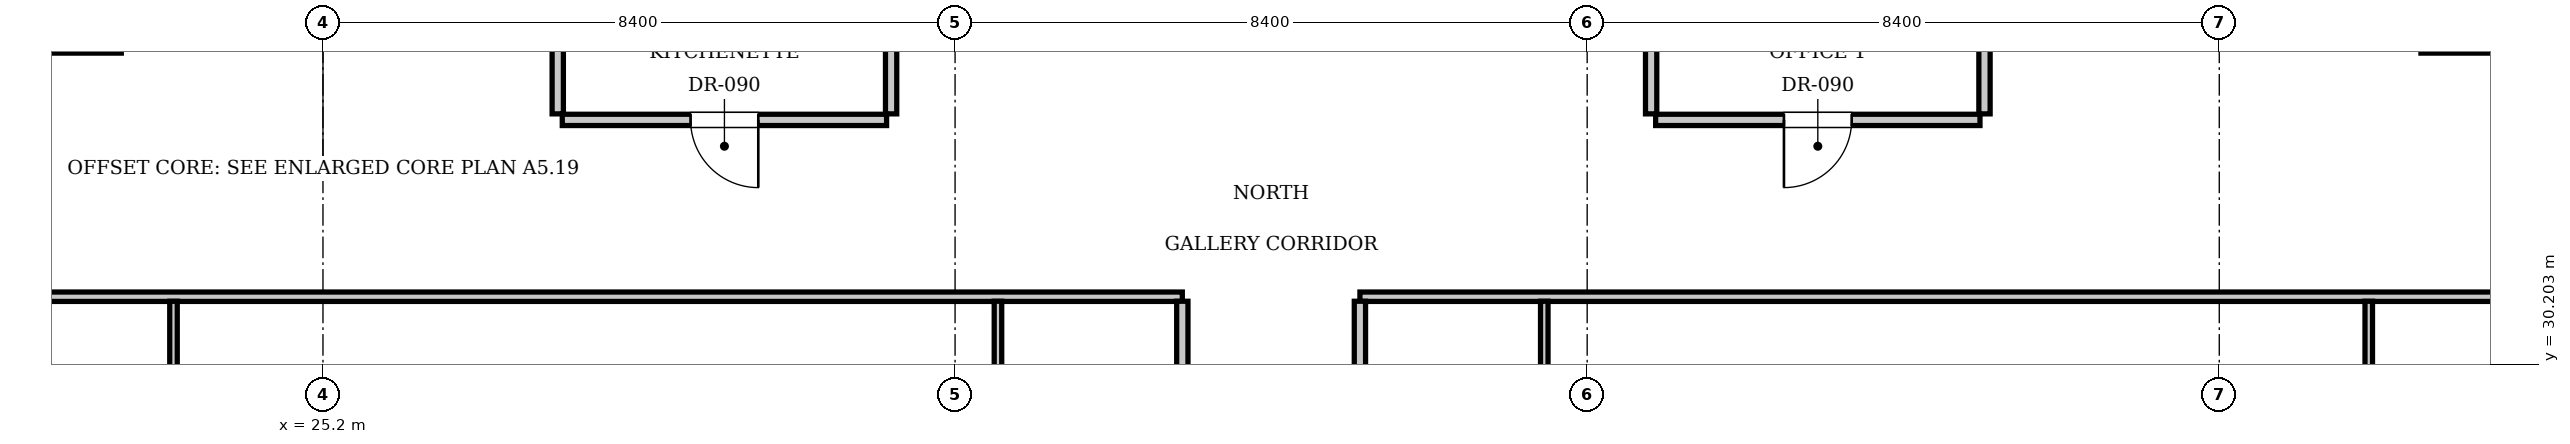
"""IFC4 building model, lengths in metres.
Left out: names, types, materials, properties, quantities, classifications, styles, units other than length and angle.
Written with IfcOpenShell. Run it as: python <this file> out.ifc"""

import sys

from ifc_helpers import new_model, si_unit, direction, frame, frame_2d, origin, place, context, subcontext, project, spatial, rectangle, extrude, element, fill, save


model = new_model("IFC4")
c1 = context("Model", 3, precision=1e-05, world=origin(), true_north=direction((0.0, 1.0)))
c2 = subcontext(c1, "Body", "Model", "MODEL_VIEW")
j1 = project(units=[si_unit("LENGTHUNIT", "METRE"), si_unit("PLANEANGLEUNIT", "RADIAN")], contexts=[c1])
p1 = place(None, origin())
s1 = spatial("IfcSite", under=j1, at=p1, CompositionType="ELEMENT")
p2 = place(p1, origin())
s2 = spatial("IfcBuilding", under=s1, at=p2, CompositionType="ELEMENT")
p3 = place(p2, frame((0.0, 0.0, 135.1)))
s3 = spatial("IfcBuildingStorey", under=s2, at=p3, CompositionType="ELEMENT", Elevation=135.1)
for number, where, z_axis, x_axis in (
    (1, (28.32, 33.53, 0.0), (0.0, 0.0, 1.0), (0.0, 1.0, 0.0)),
    (2, (32.75, 33.53, 0.0), (0.0, 0.0, 1.0), (0.0, 1.0, 0.0)),
):
    element("IfcWall", number, at=place(p3, frame(where, z_axis=z_axis, x_axis=x_axis)), inside=s3, PredefinedType="PARTITIONING", context=c2, shape_type="SweptSolid", body=[
        extrude(rectangle(XDim=2.59, YDim=0.15, at=frame_2d((1.295, 0.0))), origin(), (0.0, 0.0, 1.0), 3.61),
    ])
p4 = place(p3, frame((28.38, 33.45, 0.0), z_axis=(0.0, 0.0, 1.0), x_axis=(1.0, 0.0, 0.0)))
e3 = element("IfcWall", 3, at=p4, inside=s3, PredefinedType="PARTITIONING", context=c2, shape_type="SweptSolid", body=[
    extrude(rectangle(XDim=4.31, YDim=0.15, at=frame_2d((2.155, 0.0))), origin(), (0.0, 0.0, 1.0), 3.61),
])
p5 = place(p4, frame((1.705, 0.0, 0.0)))
e4 = element("IfcOpeningElement", 4, at=p5, cuts=e3, PredefinedType="OPENING", context=c2, shape_type="SweptSolid", body=[
    extrude(rectangle(XDim=0.9, YDim=2.1, at=frame_2d((0.45, 1.05))), frame((0.0, 0.085, 0.0), z_axis=(0.0, -1.0, 0.0), x_axis=(1.0, 0.0, 0.0)), (0.0, 0.0, 1.0), 0.17),
])
for number, where, z_axis, x_axis in (
    (5, (42.85, 33.53, 0.0), (0.0, 0.0, 1.0), (0.0, 1.0, 0.0)),
    (6, (47.28, 33.53, 0.0), (0.0, 0.0, 1.0), (0.0, 1.0, 0.0)),
):
    element("IfcWall", number, at=place(p3, frame(where, z_axis=z_axis, x_axis=x_axis)), inside=s3, PredefinedType="PARTITIONING", context=c2, shape_type="SweptSolid", body=[
        extrude(rectangle(XDim=2.59, YDim=0.15, at=frame_2d((1.295, 0.0))), origin(), (0.0, 0.0, 1.0), 3.61),
    ])
p6 = place(p3, frame((42.91, 33.45, 0.0), z_axis=(0.0, 0.0, 1.0), x_axis=(1.0, 0.0, 0.0)))
e7 = element("IfcWall", 7, at=p6, inside=s3, PredefinedType="PARTITIONING", context=c2, shape_type="SweptSolid", body=[
    extrude(rectangle(XDim=4.31, YDim=0.15, at=frame_2d((2.155, 0.0))), origin(), (0.0, 0.0, 1.0), 3.61),
])
p7 = place(p6, frame((1.705, 0.0, 0.0)))
e8 = element("IfcOpeningElement", 8, at=p7, cuts=e7, PredefinedType="OPENING", context=c2, shape_type="SweptSolid", body=[
    extrude(rectangle(XDim=0.9, YDim=2.1, at=frame_2d((0.45, 1.05))), frame((0.0, 0.085, 0.0), z_axis=(0.0, -1.0, 0.0), x_axis=(1.0, 0.0, 0.0)), (0.0, 0.0, 1.0), 0.17),
])
p8 = place(p3, frame((13.2, 31.1, 0.0), z_axis=(0.0, 0.0, 1.0), x_axis=(1.0, 0.0, 0.0)))
e9 = element("IfcWall", 9, at=p8, inside=s3, PredefinedType="PARTITIONING", context=c2, shape_type="SweptSolid", body=[
    extrude(rectangle(XDim=23.42, YDim=0.125, at=frame_2d((11.71, 0.0))), origin(), (0.0, 0.0, 1.0), 3.61),
])
p9 = place(p3, frame((38.98, 31.1, 0.0), z_axis=(0.0, 0.0, 1.0), x_axis=(1.0, 0.0, 0.0)))
e10 = element("IfcWall", 10, at=p9, inside=s3, PredefinedType="PARTITIONING", context=c2, shape_type="SweptSolid", body=[
    extrude(rectangle(XDim=23.42, YDim=0.125, at=frame_2d((11.71, 0.0))), origin(), (0.0, 0.0, 1.0), 3.61),
])
p10 = place(p3, frame((36.62, 29.15, 0.0), z_axis=(0.0, 0.0, 1.0), x_axis=(0.0, 1.0, 0.0)))
e11 = element("IfcWall", 11, at=p10, inside=s3, PredefinedType="PARTITIONING", context=c2, shape_type="SweptSolid", body=[
    extrude(rectangle(XDim=1.89, YDim=0.15, at=frame_2d((0.945, 0.0))), origin(), (0.0, 0.0, 1.0), 3.61),
])
p11 = place(p3, frame((34.17, 29.15, 0.0), z_axis=(0.0, 0.0, 1.0), x_axis=(0.0, 1.0, 0.0)))
e12 = element("IfcWall", 12, at=p11, inside=s3, PredefinedType="PARTITIONING", context=c2, shape_type="SweptSolid", body=[
    extrude(rectangle(XDim=1.89, YDim=0.1, at=frame_2d((0.945, 0.0))), origin(), (0.0, 0.0, 1.0), 3.61),
])
p12 = place(p3, frame((23.214, 27.16, 0.0), z_axis=(0.0, 0.0, 1.0), x_axis=(0.0, 1.0, 0.0)))
e13 = element("IfcWall", 13, at=p12, inside=s3, PredefinedType="PARTITIONING", context=c2, shape_type="SweptSolid", body=[
    extrude(rectangle(XDim=3.88, YDim=0.1, at=frame_2d((1.94, 0.0))), origin(), (0.0, 0.0, 1.0), 3.61),
])
p13 = place(p12, frame((1.49, 0.0, 0.0)))
e14 = element("IfcOpeningElement", 14, at=p13, cuts=e13, PredefinedType="OPENING", context=c2, shape_type="SweptSolid", body=[
    extrude(rectangle(XDim=0.9, YDim=2.1, at=frame_2d((0.45, 1.05))), frame((0.0, 0.06, 0.0), z_axis=(0.0, -1.0, 0.0), x_axis=(1.0, 0.0, 0.0)), (0.0, 0.0, 1.0), 0.12),
])
p14 = place(p3, frame((38.98, 29.15, 0.0), z_axis=(0.0, 0.0, 1.0), x_axis=(0.0, 1.0, 0.0)))
e15 = element("IfcWall", 15, at=p14, inside=s3, PredefinedType="PARTITIONING", context=c2, shape_type="SweptSolid", body=[
    extrude(rectangle(XDim=1.89, YDim=0.15, at=frame_2d((0.945, 0.0))), origin(), (0.0, 0.0, 1.0), 3.61),
])
p15 = place(p3, frame((41.43, 29.15, 0.0), z_axis=(0.0, 0.0, 1.0), x_axis=(0.0, 1.0, 0.0)))
e16 = element("IfcWall", 16, at=p15, inside=s3, PredefinedType="PARTITIONING", context=c2, shape_type="SweptSolid", body=[
    extrude(rectangle(XDim=1.89, YDim=0.1, at=frame_2d((0.945, 0.0))), origin(), (0.0, 0.0, 1.0), 3.61),
])
p16 = place(p3, frame((52.386, 27.16, 0.0), z_axis=(0.0, 0.0, 1.0), x_axis=(0.0, 1.0, 0.0)))
e17 = element("IfcWall", 17, at=p16, inside=s3, PredefinedType="PARTITIONING", context=c2, shape_type="SweptSolid", body=[
    extrude(rectangle(XDim=3.88, YDim=0.1, at=frame_2d((1.94, 0.0))), origin(), (0.0, 0.0, 1.0), 3.61),
])
p17 = place(p16, frame((1.49, 0.0, 0.0)))
e18 = element("IfcOpeningElement", 18, at=p17, cuts=e17, PredefinedType="OPENING", context=c2, shape_type="SweptSolid", body=[
    extrude(rectangle(XDim=0.9, YDim=2.1, at=frame_2d((0.45, 1.05))), frame((0.0, 0.06, 0.0), z_axis=(0.0, -1.0, 0.0), x_axis=(1.0, 0.0, 0.0)), (0.0, 0.0, 1.0), 0.12),
])
p18 = place(p3, frame((13.2, 34.4, 0.0), z_axis=(0.0, 0.0, 1.0), x_axis=(1.0, 0.0, 0.0)))
e19 = element("IfcWall", 19, at=p18, inside=s3, PredefinedType="PARTITIONING", context=c2, shape_type="SweptSolid", body=[
    extrude(rectangle(XDim=9.32, YDim=0.125, at=frame_2d((4.66, 0.0))), origin(), (0.0, 0.0, 1.0), 3.61),
])
p19 = place(p3, frame((53.08, 34.4, 0.0), z_axis=(0.0, 0.0, 1.0), x_axis=(1.0, 0.0, 0.0)))
e20 = element("IfcWall", 20, at=p19, inside=s3, PredefinedType="PARTITIONING", context=c2, shape_type="SweptSolid", body=[
    extrude(rectangle(XDim=9.32, YDim=0.125, at=frame_2d((4.66, 0.0))), origin(), (0.0, 0.0, 1.0), 3.61),
])
p20 = place(p5, frame((0.9, 0.0, 0.0), z_axis=(0.0, 0.0, 1.0), x_axis=(-1.0, 0.0, 0.0)))
e21 = element("IfcDoor", 21, at=p20, inside=s3, OperationType="SINGLE_SWING_LEFT", PredefinedType="DOOR", context=c2, shape_type="SweptSolid", body=[
    extrude(rectangle(XDim=0.9, YDim=2.1, at=frame_2d((0.45, 1.05))), frame((0.0, 0.025, 0.0), z_axis=(0.0, -1.0, 0.0), x_axis=(1.0, 0.0, 0.0)), (0.0, 0.0, 1.0), 0.05),
])
fill(e4, e21)
p21 = place(p7, frame((0.9, 0.0, 0.0), z_axis=(0.0, 0.0, 1.0), x_axis=(-1.0, 0.0, 0.0)))
e22 = element("IfcDoor", 22, at=p21, inside=s3, OperationType="SINGLE_SWING_RIGHT", PredefinedType="DOOR", context=c2, shape_type="SweptSolid", body=[
    extrude(rectangle(XDim=0.9, YDim=2.1, at=frame_2d((0.45, 1.05))), frame((0.0, 0.025, 0.0), z_axis=(0.0, -1.0, 0.0), x_axis=(1.0, 0.0, 0.0)), (0.0, 0.0, 1.0), 0.05),
])
fill(e8, e22)
save(model, sys.argv[1])
